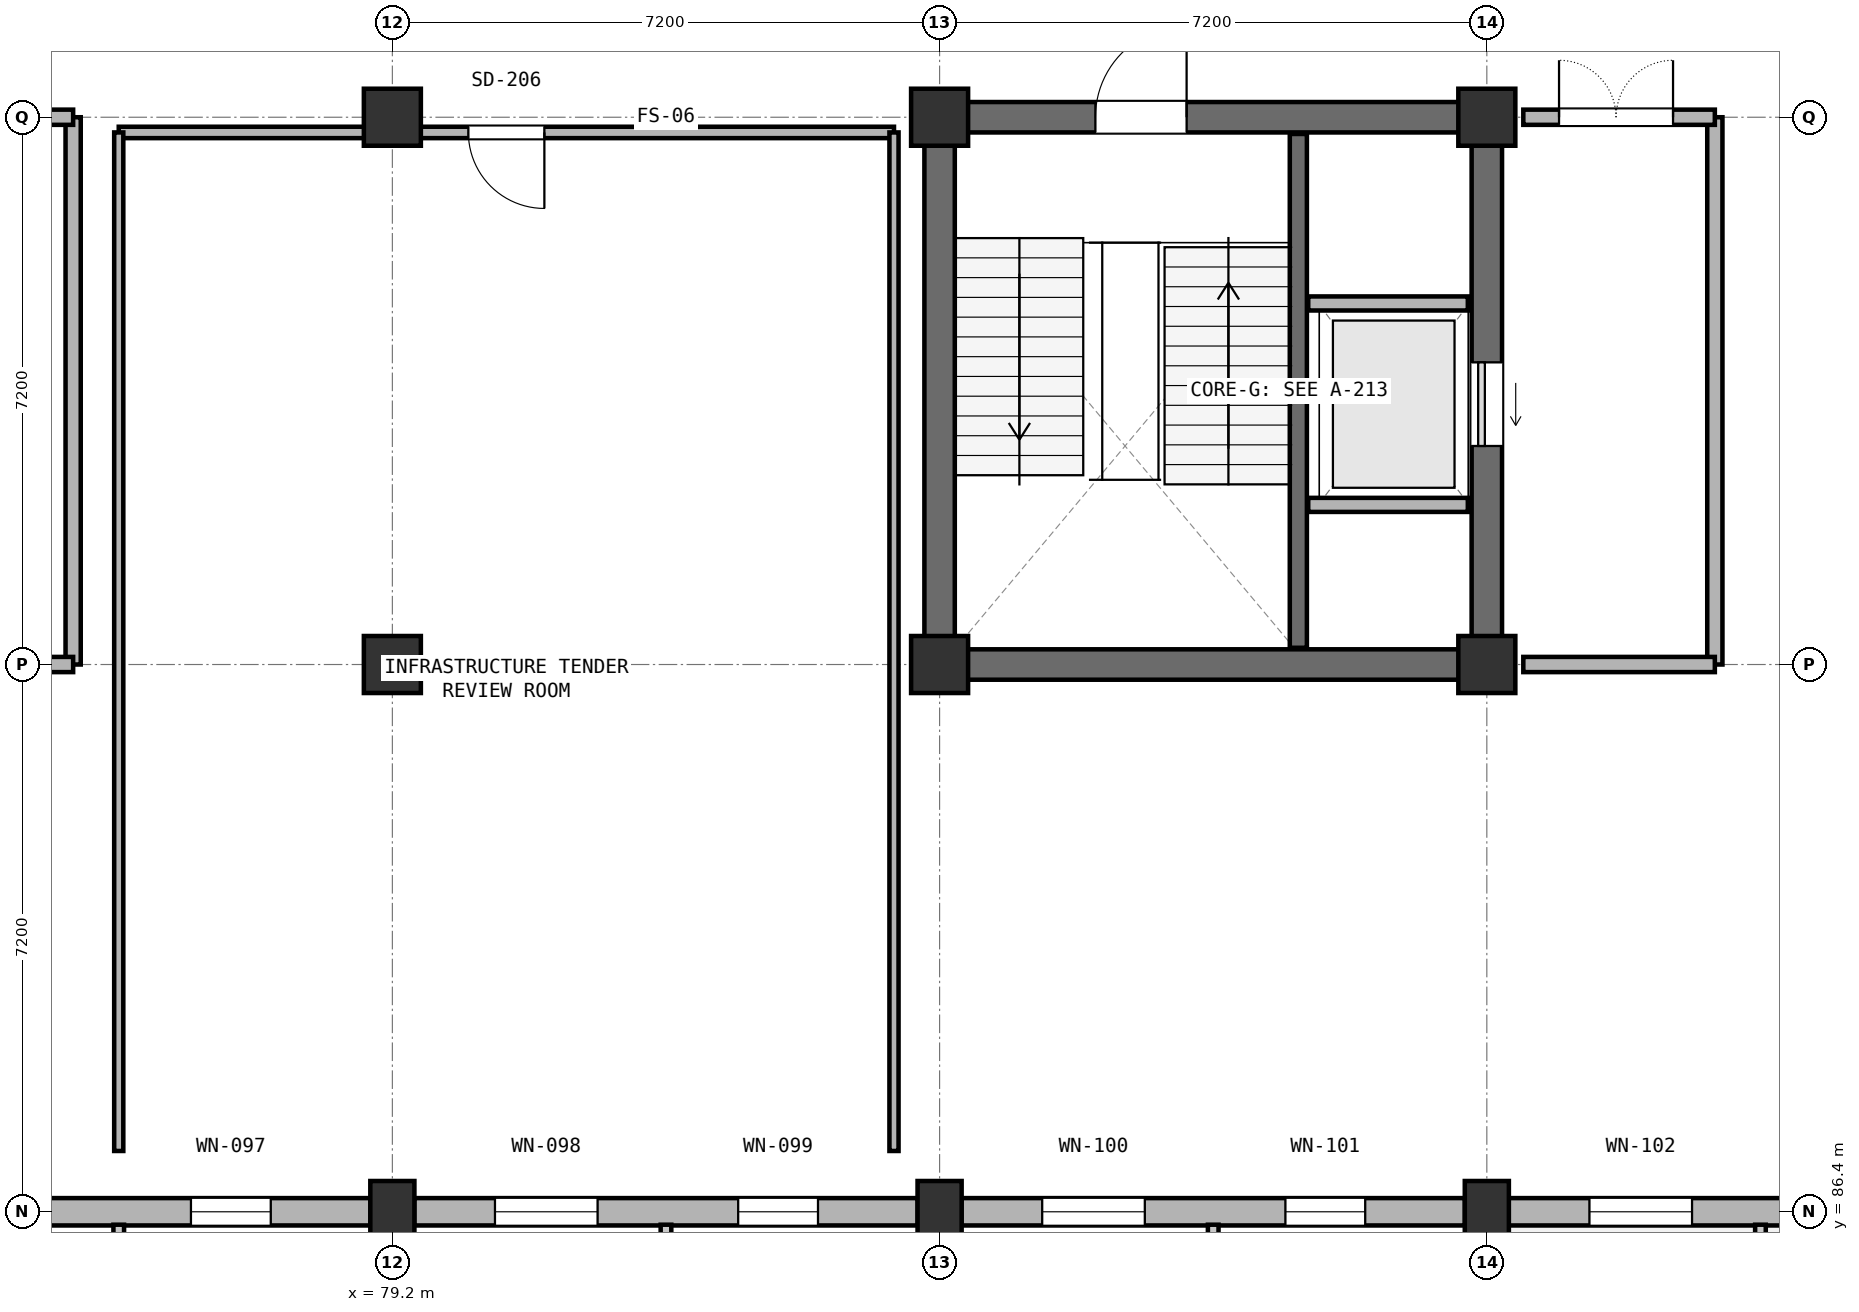
"""IFC4 building model, lengths in metres.
Left out: names, types, materials, properties, quantities, classifications, styles, units other than length and angle.
Written with IfcOpenShell. Run it as: python <this file> out.ifc"""

import sys

from ifc_helpers import new_model, si_unit, direction, frame, frame_2d, origin, origin_2d, place, context, subcontext, project, spatial, rectangle, extrude, element, fill, save


model = new_model("IFC4")
c1 = context("Model", 3, precision=1e-05, world=origin(), true_north=direction((0.0, 1.0)))
c2 = subcontext(c1, "Body", "Model", "MODEL_VIEW")
j1 = project(units=[si_unit("LENGTHUNIT", "METRE"), si_unit("PLANEANGLEUNIT", "RADIAN")], contexts=[c1])
p1 = place(None, origin())
s1 = spatial("IfcSite", under=j1, at=p1, CompositionType="ELEMENT")
p2 = place(p1, origin())
s2 = spatial("IfcBuilding", under=s1, at=p2, CompositionType="ELEMENT")
p3 = place(p2, frame((0.0, 0.0, 14.4)))
s3 = spatial("IfcBuildingStorey", under=s2, at=p3, CompositionType="ELEMENT", Elevation=14.4)
p4 = place(p3, frame((79.2, 86.4, 0.0), z_axis=(0.0, 0.0, 1.0), x_axis=(1.0, 0.0, 0.0)))
e1 = element("IfcColumn", 1, at=p4, inside=s3, PredefinedType="COLUMN", context=c2, shape_type="SweptSolid", body=[
    extrude(rectangle(XDim=0.58, YDim=0.81, at=origin_2d()), origin(), (0.0, 0.0, 1.0), 4.2),
])
for number, where, z_axis, x_axis in (
    (2, (79.2, 93.6, 0.0), (0.0, 0.0, 1.0), (1.0, 0.0, 0.0)),
    (3, (79.2, 100.8, 0.0), (0.0, 0.0, 1.0), (1.0, 0.0, 0.0)),
):
    element("IfcColumn", number, at=place(p3, frame(where, z_axis=z_axis, x_axis=x_axis)), inside=s3, PredefinedType="COLUMN", context=c2, shape_type="SweptSolid", body=[
        extrude(rectangle(XDim=0.75, YDim=0.75, at=origin_2d()), origin(), (0.0, 0.0, 1.0), 4.2),
    ])
p5 = place(p3, frame((86.4, 86.4, 0.0), z_axis=(0.0, 0.0, 1.0), x_axis=(1.0, 0.0, 0.0)))
e4 = element("IfcColumn", 4, at=p5, inside=s3, PredefinedType="COLUMN", context=c2, shape_type="SweptSolid", body=[
    extrude(rectangle(XDim=0.58, YDim=0.81, at=origin_2d()), origin(), (0.0, 0.0, 1.0), 4.2),
])
for number, where, z_axis, x_axis in (
    (5, (86.4, 93.6, 0.0), (0.0, 0.0, 1.0), (1.0, 0.0, 0.0)),
    (6, (86.4, 100.8, 0.0), (0.0, 0.0, 1.0), (1.0, 0.0, 0.0)),
):
    element("IfcColumn", number, at=place(p3, frame(where, z_axis=z_axis, x_axis=x_axis)), inside=s3, PredefinedType="COLUMN", context=c2, shape_type="SweptSolid", body=[
        extrude(rectangle(XDim=0.75, YDim=0.75, at=origin_2d()), origin(), (0.0, 0.0, 1.0), 4.2),
    ])
p6 = place(p3, frame((93.6, 86.4, 0.0), z_axis=(0.0, 0.0, 1.0), x_axis=(1.0, 0.0, 0.0)))
e7 = element("IfcColumn", 7, at=p6, inside=s3, PredefinedType="COLUMN", context=c2, shape_type="SweptSolid", body=[
    extrude(rectangle(XDim=0.58, YDim=0.81, at=origin_2d()), origin(), (0.0, 0.0, 1.0), 4.2),
])
for number, where, z_axis, x_axis in (
    (8, (93.6, 93.6, 0.0), (0.0, 0.0, 1.0), (1.0, 0.0, 0.0)),
    (9, (93.6, 100.8, 0.0), (0.0, 0.0, 1.0), (1.0, 0.0, 0.0)),
):
    element("IfcColumn", number, at=place(p3, frame(where, z_axis=z_axis, x_axis=x_axis)), inside=s3, PredefinedType="COLUMN", context=c2, shape_type="SweptSolid", body=[
        extrude(rectangle(XDim=0.75, YDim=0.75, at=origin_2d()), origin(), (0.0, 0.0, 1.0), 4.2),
    ])
p7 = place(p3, frame((86.75, 93.6, 0.0), z_axis=(0.0, 0.0, 1.0), x_axis=(1.0, 0.0, 0.0)))
e10 = element("IfcWall", 10, at=p7, inside=s3, PredefinedType="SHEAR", context=c2, shape_type="SweptSolid", body=[
    extrude(rectangle(XDim=6.5, YDim=0.4, at=frame_2d((3.25, 0.0))), origin(), (0.0, 0.0, 1.0), 4.2),
])
p8 = place(p3, frame((93.6, 93.95, 0.0), z_axis=(0.0, 0.0, 1.0), x_axis=(0.0, 1.0, 0.0)))
e11 = element("IfcWall", 11, at=p8, inside=s3, PredefinedType="SHEAR", context=c2, shape_type="SweptSolid", body=[
    extrude(rectangle(XDim=6.5, YDim=0.4, at=frame_2d((3.25, 0.0))), origin(), (0.0, 0.0, 1.0), 4.2),
])
p9 = place(p8, frame((2.525, 0.0, 0.0)))
e12 = element("IfcOpeningElement", 12, at=p9, cuts=e11, PredefinedType="OPENING", context=c2, shape_type="SweptSolid", body=[
    extrude(rectangle(XDim=1.1, YDim=2.2, at=frame_2d((0.55, 1.1))), frame((0.0, 0.21, 0.0), z_axis=(0.0, -1.0, 0.0), x_axis=(1.0, 0.0, 0.0)), (0.0, 0.0, 1.0), 0.42),
])
p10 = place(p3, frame((93.25, 100.8, 0.0), z_axis=(0.0, 0.0, 1.0), x_axis=(-1.0, 0.0, 0.0)))
e13 = element("IfcWall", 13, at=p10, inside=s3, PredefinedType="SHEAR", context=c2, shape_type="SweptSolid", body=[
    extrude(rectangle(XDim=6.5, YDim=0.4, at=frame_2d((3.25, 0.0))), origin(), (0.0, 0.0, 1.0), 4.2),
])
p11 = place(p10, frame((3.6, 0.0, 0.0)))
e14 = element("IfcOpeningElement", 14, at=p11, cuts=e13, PredefinedType="OPENING", context=c2, shape_type="SweptSolid", body=[
    extrude(rectangle(XDim=1.2, YDim=2.2, at=frame_2d((0.6, 1.1))), frame((0.0, 0.21, 0.0), z_axis=(0.0, -1.0, 0.0), x_axis=(1.0, 0.0, 0.0)), (0.0, 0.0, 1.0), 0.42),
])
p12 = place(p3, frame((86.4, 100.45, 0.0), z_axis=(0.0, 0.0, 1.0), x_axis=(0.0, -1.0, 0.0)))
e15 = element("IfcWall", 15, at=p12, inside=s3, PredefinedType="SHEAR", context=c2, shape_type="SweptSolid", body=[
    extrude(rectangle(XDim=6.5, YDim=0.4, at=frame_2d((3.25, 0.0))), origin(), (0.0, 0.0, 1.0), 4.2),
])
p13 = place(p3, frame((91.12, 93.82, 0.0), z_axis=(0.0, 0.0, 1.0), x_axis=(0.0, 1.0, 0.0)))
e16 = element("IfcWall", 16, at=p13, inside=s3, PredefinedType="SHEAR", context=c2, shape_type="SweptSolid", body=[
    extrude(rectangle(XDim=6.76, YDim=0.225, at=frame_2d((3.38, 0.0))), origin(), (0.0, 0.0, 1.0), 4.2),
])
for number, where, z_axis, x_axis in (
    (17, (91.25, 95.7, 0.0), (0.0, 0.0, 1.0), (1.0, 0.0, 0.0)),
    (18, (91.25, 98.35, 0.0), (0.0, 0.0, 1.0), (1.0, 0.0, 0.0)),
):
    element("IfcWall", number, at=place(p3, frame(where, z_axis=z_axis, x_axis=x_axis)), inside=s3, PredefinedType="PARTITIONING", context=c2, shape_type="SweptSolid", body=[
        extrude(rectangle(XDim=2.1, YDim=0.185, at=frame_2d((1.05, 0.0))), origin(), (0.0, 0.0, 1.0), 4.2),
    ])
p14 = place(p3, frame((72.288, 86.4, 0.0), z_axis=(0.0, 0.0, 1.0), x_axis=(1.0, 0.0, 0.0)))
e19 = element("IfcWall", 19, at=p14, inside=s3, PredefinedType="SOLIDWALL", context=c2, shape_type="SweptSolid", body=[
    extrude(rectangle(XDim=6.624, YDim=0.36, at=frame_2d((3.312, 0.0))), origin(), (0.0, 0.0, 1.0), 3.04),
])
p15 = place(p14, frame((1.062, 0.0, 0.7)))
e20 = element("IfcOpeningElement", 20, at=p15, cuts=e19, PredefinedType="OPENING", context=c2, shape_type="SweptSolid", body=[
    extrude(rectangle(XDim=1.35, YDim=2.19, at=frame_2d((0.675, 1.095))), frame((0.0, 0.19, 0.0), z_axis=(0.0, -1.0, 0.0), x_axis=(1.0, 0.0, 0.0)), (0.0, 0.0, 1.0), 0.38),
])
p16 = place(p14, frame((4.262, 0.0, 0.7)))
e21 = element("IfcOpeningElement", 21, at=p16, cuts=e19, PredefinedType="OPENING", context=c2, shape_type="SweptSolid", body=[
    extrude(rectangle(XDim=1.05, YDim=2.19, at=frame_2d((0.525, 1.095))), frame((0.0, 0.19, 0.0), z_axis=(0.0, -1.0, 0.0), x_axis=(1.0, 0.0, 0.0)), (0.0, 0.0, 1.0), 0.38),
])
p17 = place(p3, frame((79.488, 86.4, 0.0), z_axis=(0.0, 0.0, 1.0), x_axis=(1.0, 0.0, 0.0)))
e22 = element("IfcWall", 22, at=p17, inside=s3, PredefinedType="SOLIDWALL", context=c2, shape_type="SweptSolid", body=[
    extrude(rectangle(XDim=6.624, YDim=0.36, at=frame_2d((3.312, 0.0))), origin(), (0.0, 0.0, 1.0), 3.04),
])
p18 = place(p17, frame((1.062, 0.0, 0.7)))
e23 = element("IfcOpeningElement", 23, at=p18, cuts=e22, PredefinedType="OPENING", context=c2, shape_type="SweptSolid", body=[
    extrude(rectangle(XDim=1.35, YDim=2.19, at=frame_2d((0.675, 1.095))), frame((0.0, 0.19, 0.0), z_axis=(0.0, -1.0, 0.0), x_axis=(1.0, 0.0, 0.0)), (0.0, 0.0, 1.0), 0.38),
])
p19 = place(p17, frame((4.262, 0.0, 0.7)))
e24 = element("IfcOpeningElement", 24, at=p19, cuts=e22, PredefinedType="OPENING", context=c2, shape_type="SweptSolid", body=[
    extrude(rectangle(XDim=1.05, YDim=2.19, at=frame_2d((0.525, 1.095))), frame((0.0, 0.19, 0.0), z_axis=(0.0, -1.0, 0.0), x_axis=(1.0, 0.0, 0.0)), (0.0, 0.0, 1.0), 0.38),
])
p20 = place(p3, frame((86.688, 86.4, 0.0), z_axis=(0.0, 0.0, 1.0), x_axis=(1.0, 0.0, 0.0)))
e25 = element("IfcWall", 25, at=p20, inside=s3, PredefinedType="SOLIDWALL", context=c2, shape_type="SweptSolid", body=[
    extrude(rectangle(XDim=6.624, YDim=0.36, at=frame_2d((3.312, 0.0))), origin(), (0.0, 0.0, 1.0), 3.04),
])
p21 = place(p20, frame((1.062, 0.0, 0.7)))
e26 = element("IfcOpeningElement", 26, at=p21, cuts=e25, PredefinedType="OPENING", context=c2, shape_type="SweptSolid", body=[
    extrude(rectangle(XDim=1.35, YDim=2.19, at=frame_2d((0.675, 1.095))), frame((0.0, 0.19, 0.0), z_axis=(0.0, -1.0, 0.0), x_axis=(1.0, 0.0, 0.0)), (0.0, 0.0, 1.0), 0.38),
])
p22 = place(p20, frame((4.262, 0.0, 0.7)))
e27 = element("IfcOpeningElement", 27, at=p22, cuts=e25, PredefinedType="OPENING", context=c2, shape_type="SweptSolid", body=[
    extrude(rectangle(XDim=1.05, YDim=2.19, at=frame_2d((0.525, 1.095))), frame((0.0, 0.19, 0.0), z_axis=(0.0, -1.0, 0.0), x_axis=(1.0, 0.0, 0.0)), (0.0, 0.0, 1.0), 0.38),
])
p23 = place(p3, frame((93.888, 86.4, 0.0), z_axis=(0.0, 0.0, 1.0), x_axis=(1.0, 0.0, 0.0)))
e28 = element("IfcWall", 28, at=p23, inside=s3, PredefinedType="SOLIDWALL", context=c2, shape_type="SweptSolid", body=[
    extrude(rectangle(XDim=6.624, YDim=0.36, at=frame_2d((3.312, 0.0))), origin(), (0.0, 0.0, 1.0), 3.04),
])
p24 = place(p23, frame((1.062, 0.0, 0.7)))
e29 = element("IfcOpeningElement", 29, at=p24, cuts=e28, PredefinedType="OPENING", context=c2, shape_type="SweptSolid", body=[
    extrude(rectangle(XDim=1.35, YDim=2.19, at=frame_2d((0.675, 1.095))), frame((0.0, 0.19, 0.0), z_axis=(0.0, -1.0, 0.0), x_axis=(1.0, 0.0, 0.0)), (0.0, 0.0, 1.0), 0.38),
])
p25 = place(p23, frame((4.262, 0.0, 0.7)))
e30 = element("IfcOpeningElement", 30, at=p25, cuts=e28, PredefinedType="OPENING", context=c2, shape_type="SweptSolid", body=[
    extrude(rectangle(XDim=1.05, YDim=2.19, at=frame_2d((0.525, 1.095))), frame((0.0, 0.19, 0.0), z_axis=(0.0, -1.0, 0.0), x_axis=(1.0, 0.0, 0.0)), (0.0, 0.0, 1.0), 0.38),
])
p26 = place(p3, frame((75.0, 93.6, 0.0), z_axis=(0.0, 0.0, 1.0), x_axis=(0.0, 1.0, 0.0)))
e31 = element("IfcWall", 31, at=p26, inside=s3, PredefinedType="PARTITIONING", context=c2, shape_type="SweptSolid", body=[
    extrude(rectangle(XDim=7.2, YDim=0.2, at=frame_2d((3.6, 0.0))), origin(), (0.0, 0.0, 1.0), 3.08),
])
p27 = place(p3, frame((72.48, 93.6, 0.0), z_axis=(0.0, 0.0, 1.0), x_axis=(1.0, 0.0, 0.0)))
e32 = element("IfcWall", 32, at=p27, inside=s3, PredefinedType="PARTITIONING", context=c2, shape_type="SweptSolid", body=[
    extrude(rectangle(XDim=2.52, YDim=0.2, at=frame_2d((1.26, 0.0))), origin(), (0.0, 0.0, 1.0), 3.08),
])
p28 = place(p3, frame((75.0, 100.8, 0.0), z_axis=(0.0, 0.0, 1.0), x_axis=(-1.0, 0.0, 0.0)))
e33 = element("IfcWall", 33, at=p28, inside=s3, PredefinedType="PARTITIONING", context=c2, shape_type="SweptSolid", body=[
    extrude(rectangle(XDim=2.52, YDim=0.2, at=frame_2d((1.26, 0.0))), origin(), (0.0, 0.0, 1.0), 3.08),
])
p29 = place(p28, frame((0.55, 0.0, 0.0)))
e34 = element("IfcOpeningElement", 34, at=p29, cuts=e33, PredefinedType="OPENING", context=c2, shape_type="SweptSolid", body=[
    extrude(rectangle(XDim=1.5, YDim=2.2, at=frame_2d((0.75, 1.1))), frame((0.0, 0.11, 0.0), z_axis=(0.0, -1.0, 0.0), x_axis=(1.0, 0.0, 0.0)), (0.0, 0.0, 1.0), 0.22),
])
p30 = place(p3, frame((96.6, 93.6, 0.0), z_axis=(0.0, 0.0, 1.0), x_axis=(0.0, 1.0, 0.0)))
e35 = element("IfcWall", 35, at=p30, inside=s3, PredefinedType="PARTITIONING", context=c2, shape_type="SweptSolid", body=[
    extrude(rectangle(XDim=7.2, YDim=0.2, at=frame_2d((3.6, 0.0))), origin(), (0.0, 0.0, 1.0), 3.08),
])
p31 = place(p3, frame((94.08, 93.6, 0.0), z_axis=(0.0, 0.0, 1.0), x_axis=(1.0, 0.0, 0.0)))
e36 = element("IfcWall", 36, at=p31, inside=s3, PredefinedType="PARTITIONING", context=c2, shape_type="SweptSolid", body=[
    extrude(rectangle(XDim=2.52, YDim=0.2, at=frame_2d((1.26, 0.0))), origin(), (0.0, 0.0, 1.0), 3.08),
])
p32 = place(p3, frame((96.6, 100.8, 0.0), z_axis=(0.0, 0.0, 1.0), x_axis=(-1.0, 0.0, 0.0)))
e37 = element("IfcWall", 37, at=p32, inside=s3, PredefinedType="PARTITIONING", context=c2, shape_type="SweptSolid", body=[
    extrude(rectangle(XDim=2.52, YDim=0.2, at=frame_2d((1.26, 0.0))), origin(), (0.0, 0.0, 1.0), 3.08),
])
p33 = place(p32, frame((0.55, 0.0, 0.0)))
e38 = element("IfcOpeningElement", 38, at=p33, cuts=e37, PredefinedType="OPENING", context=c2, shape_type="SweptSolid", body=[
    extrude(rectangle(XDim=1.5, YDim=2.2, at=frame_2d((0.75, 1.1))), frame((0.0, 0.11, 0.0), z_axis=(0.0, -1.0, 0.0), x_axis=(1.0, 0.0, 0.0)), (0.0, 0.0, 1.0), 0.22),
])
p34 = place(p3, frame((85.8, 100.6, 0.0), z_axis=(0.0, 0.0, 1.0), x_axis=(-1.0, 0.0, 0.0)))
e39 = element("IfcWall", 39, at=p34, inside=s3, PredefinedType="PARTITIONING", context=c2, shape_type="SweptSolid", body=[
    extrude(rectangle(XDim=10.2, YDim=0.15, at=frame_2d((5.1, 0.0))), origin(), (0.0, 0.0, 1.0), 3.08),
])
p35 = place(p34, frame((4.6, 0.0, 0.0)))
e40 = element("IfcOpeningElement", 40, at=p35, cuts=e39, PredefinedType="OPENING", context=c2, shape_type="SweptSolid", body=[
    extrude(rectangle(XDim=1.0, YDim=2.15, at=frame_2d((0.5, 1.075))), frame((0.0, 0.085, 0.0), z_axis=(0.0, -1.0, 0.0), x_axis=(1.0, 0.0, 0.0)), (0.0, 0.0, 1.0), 0.17),
])
for number, where, z_axis, x_axis in (
    (41, (75.6, 87.2, 0.0), (0.0, 0.0, 1.0), (0.0, 1.0, 0.0)),
    (42, (85.8, 100.6, 0.0), (0.0, 0.0, 1.0), (0.0, -1.0, 0.0)),
):
    element("IfcWall", number, at=place(p3, frame(where, z_axis=z_axis, x_axis=x_axis)), inside=s3, PredefinedType="PARTITIONING", context=c2, shape_type="SweptSolid", body=[
        extrude(rectangle(XDim=13.4, YDim=0.12, at=frame_2d((6.7, 0.0))), origin(), (0.0, 0.0, 1.0), 3.08),
    ])
p36 = place(p9, origin())
e43 = element("IfcDoor", 43, at=p36, inside=s3, OperationType="SLIDING_TO_LEFT", PredefinedType="DOOR", context=c2, shape_type="SweptSolid", body=[
    extrude(rectangle(XDim=1.1, YDim=2.2, at=frame_2d((0.55, 1.1))), frame((0.0, 0.025, 0.0), z_axis=(0.0, -1.0, 0.0), x_axis=(1.0, 0.0, 0.0)), (0.0, 0.0, 1.0), 0.05),
])
fill(e12, e43)
p37 = place(p16, origin())
e44 = element("IfcWindow", 44, at=p37, inside=s3, PartitioningType="SINGLE_PANEL", PredefinedType="WINDOW", context=c2, shape_type="SweptSolid", body=[
    extrude(rectangle(XDim=1.05, YDim=2.19, at=frame_2d((0.525, 1.095))), frame((0.0, 0.03, 0.0), z_axis=(0.0, -1.0, 0.0), x_axis=(1.0, 0.0, 0.0)), (0.0, 0.0, 1.0), 0.06),
])
fill(e21, e44)
p38 = place(p18, origin())
e45 = element("IfcWindow", 45, at=p38, inside=s3, PartitioningType="DOUBLE_PANEL_VERTICAL", PredefinedType="WINDOW", context=c2, shape_type="SweptSolid", body=[
    extrude(rectangle(XDim=1.35, YDim=2.19, at=frame_2d((0.675, 1.095))), frame((0.0, 0.03, 0.0), z_axis=(0.0, -1.0, 0.0), x_axis=(1.0, 0.0, 0.0)), (0.0, 0.0, 1.0), 0.06),
])
fill(e23, e45)
p39 = place(p19, origin())
e46 = element("IfcWindow", 46, at=p39, inside=s3, PartitioningType="SINGLE_PANEL", PredefinedType="WINDOW", context=c2, shape_type="SweptSolid", body=[
    extrude(rectangle(XDim=1.05, YDim=2.19, at=frame_2d((0.525, 1.095))), frame((0.0, 0.03, 0.0), z_axis=(0.0, -1.0, 0.0), x_axis=(1.0, 0.0, 0.0)), (0.0, 0.0, 1.0), 0.06),
])
fill(e24, e46)
p40 = place(p21, origin())
e47 = element("IfcWindow", 47, at=p40, inside=s3, PartitioningType="DOUBLE_PANEL_VERTICAL", PredefinedType="WINDOW", context=c2, shape_type="SweptSolid", body=[
    extrude(rectangle(XDim=1.35, YDim=2.19, at=frame_2d((0.675, 1.095))), frame((0.0, 0.03, 0.0), z_axis=(0.0, -1.0, 0.0), x_axis=(1.0, 0.0, 0.0)), (0.0, 0.0, 1.0), 0.06),
])
fill(e26, e47)
p41 = place(p22, origin())
e48 = element("IfcWindow", 48, at=p41, inside=s3, PartitioningType="SINGLE_PANEL", PredefinedType="WINDOW", context=c2, shape_type="SweptSolid", body=[
    extrude(rectangle(XDim=1.05, YDim=2.19, at=frame_2d((0.525, 1.095))), frame((0.0, 0.03, 0.0), z_axis=(0.0, -1.0, 0.0), x_axis=(1.0, 0.0, 0.0)), (0.0, 0.0, 1.0), 0.06),
])
fill(e27, e48)
p42 = place(p24, origin())
e49 = element("IfcWindow", 49, at=p42, inside=s3, PartitioningType="DOUBLE_PANEL_VERTICAL", PredefinedType="WINDOW", context=c2, shape_type="SweptSolid", body=[
    extrude(rectangle(XDim=1.35, YDim=2.19, at=frame_2d((0.675, 1.095))), frame((0.0, 0.03, 0.0), z_axis=(0.0, -1.0, 0.0), x_axis=(1.0, 0.0, 0.0)), (0.0, 0.0, 1.0), 0.06),
])
fill(e29, e49)
p43 = place(p11, frame((1.2, 0.0, 0.0), z_axis=(0.0, 0.0, 1.0), x_axis=(-1.0, 0.0, 0.0)))
e50 = element("IfcDoor", 50, at=p43, inside=s3, OperationType="SINGLE_SWING_RIGHT", PredefinedType="DOOR", context=c2, shape_type="SweptSolid", body=[
    extrude(rectangle(XDim=1.2, YDim=2.2, at=frame_2d((0.6, 1.1))), frame((0.0, 0.025, 0.0), z_axis=(0.0, -1.0, 0.0), x_axis=(1.0, 0.0, 0.0)), (0.0, 0.0, 1.0), 0.05),
])
fill(e14, e50)
p44 = place(p33, frame((1.5, 0.0, 0.0), z_axis=(0.0, 0.0, 1.0), x_axis=(-1.0, 0.0, 0.0)))
e51 = element("IfcDoor", 51, at=p44, inside=s3, OperationType="DOUBLE_DOOR_SINGLE_SWING", PredefinedType="DOOR", context=c2, shape_type="SweptSolid", body=[
    extrude(rectangle(XDim=1.5, YDim=2.2, at=frame_2d((0.75, 1.1))), frame((0.0, 0.025, 0.0), z_axis=(0.0, -1.0, 0.0), x_axis=(1.0, 0.0, 0.0)), (0.0, 0.0, 1.0), 0.05),
])
fill(e38, e51)
p45 = place(p35, origin())
e52 = element("IfcDoor", 52, at=p45, inside=s3, OperationType="SINGLE_SWING_LEFT", PredefinedType="DOOR", context=c2, shape_type="SweptSolid", body=[
    extrude(rectangle(XDim=1.0, YDim=2.15, at=frame_2d((0.5, 1.075))), frame((0.0, 0.025, 0.0), z_axis=(0.0, -1.0, 0.0), x_axis=(1.0, 0.0, 0.0)), (0.0, 0.0, 1.0), 0.05),
])
fill(e40, e52)
save(model, sys.argv[1])
